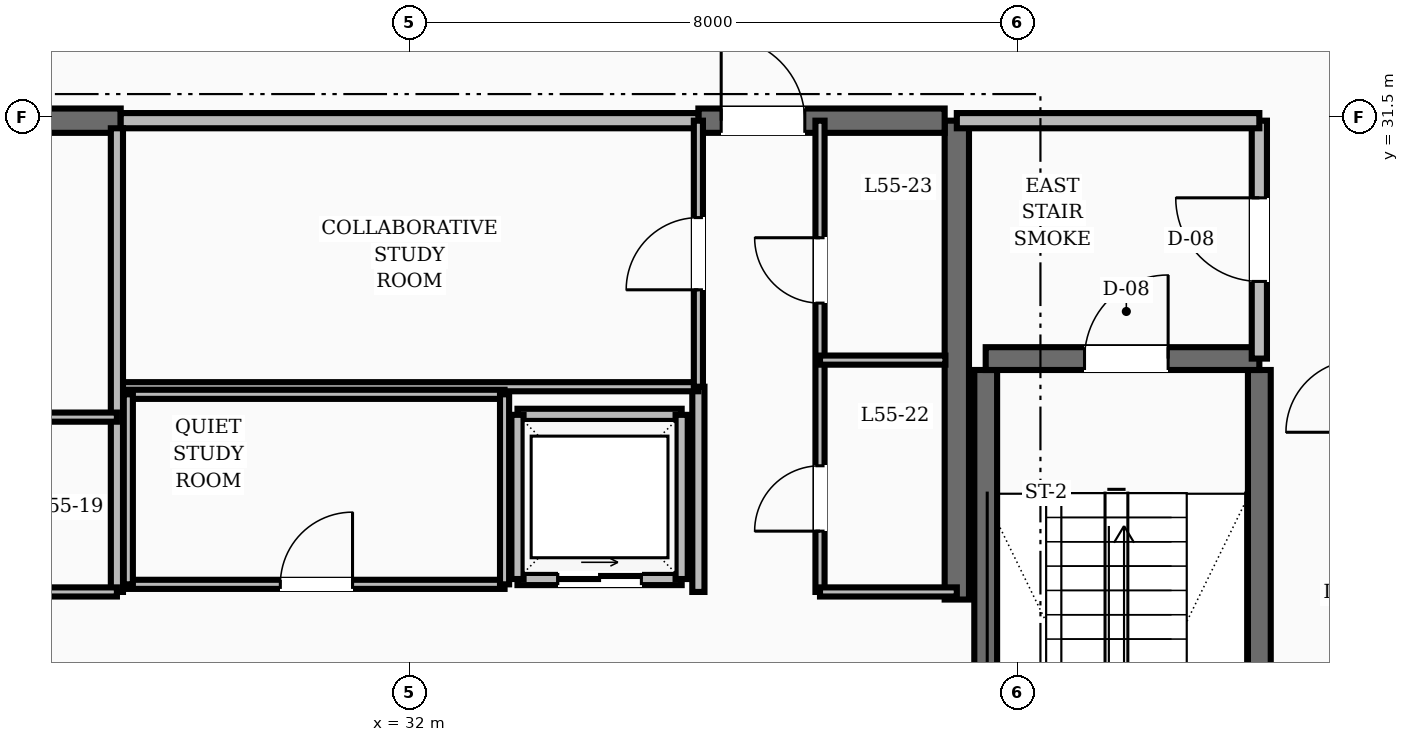
"""IFC4 building model, lengths in metres.
Left out: names, types, materials, properties, quantities, classifications, styles, units other than length and angle.
Written with IfcOpenShell. Run it as: python <this file> out.ifc"""

import sys

from ifc_helpers import new_model, si_unit, direction, frame, frame_2d, origin, place, context, subcontext, project, spatial, rectangle, extrude, element, fill, save


model = new_model("IFC4")
c1 = context("Model", 3, precision=1e-05, world=origin(), true_north=direction((0.0, 1.0)))
c2 = subcontext(c1, "Body", "Model", "MODEL_VIEW")
j1 = project(units=[si_unit("LENGTHUNIT", "METRE"), si_unit("PLANEANGLEUNIT", "RADIAN")], contexts=[c1])
p1 = place(None, origin())
s1 = spatial("IfcSite", under=j1, at=p1, CompositionType="ELEMENT")
p2 = place(p1, origin())
s2 = spatial("IfcBuilding", under=s1, at=p2, CompositionType="ELEMENT")
p3 = place(p2, frame((0.0, 0.0, 214.8)))
s3 = spatial("IfcBuildingStorey", under=s2, at=p3, CompositionType="ELEMENT", Elevation=214.8)
p4 = place(p3, frame((39.2, 25.15, 0.0), z_axis=(0.0, 0.0, 1.0), x_axis=(0.0, 1.0, 0.0)))
e1 = element("IfcWall", 1, at=p4, inside=s3, PredefinedType="SHEAR", context=c2, shape_type="SweptSolid", body=[
    extrude(rectangle(XDim=6.3, YDim=0.32, at=frame_2d((3.15, 0.0))), origin(), (0.0, 0.0, 1.0), 3.6),
])
p5 = place(p3, frame((24.96, 31.45, 0.0), z_axis=(0.0, 0.0, 1.0), x_axis=(1.0, 0.0, 0.0)))
e2 = element("IfcWall", 2, at=p5, inside=s3, PredefinedType="SHEAR", context=c2, shape_type="SweptSolid", body=[
    extrude(rectangle(XDim=3.24, YDim=0.32, at=frame_2d((1.62, 0.0))), origin(), (0.0, 0.0, 1.0), 3.6),
])
p6 = place(p3, frame((35.8, 31.45, 0.0), z_axis=(0.0, 0.0, 1.0), x_axis=(1.0, 0.0, 0.0)))
e3 = element("IfcWall", 3, at=p6, inside=s3, PredefinedType="SHEAR", context=c2, shape_type="SweptSolid", body=[
    extrude(rectangle(XDim=3.24, YDim=0.32, at=frame_2d((1.62, 0.0))), origin(), (0.0, 0.0, 1.0), 3.6),
])
p7 = place(p6, frame((0.3, 0.0, 0.0)))
e4 = element("IfcOpeningElement", 4, at=p7, cuts=e3, PredefinedType="OPENING", context=c2, shape_type="SweptSolid", body=[
    extrude(rectangle(XDim=1.1, YDim=2.1, at=frame_2d((0.55, 1.05))), frame((0.0, 0.17, 0.0), z_axis=(0.0, -1.0, 0.0), x_axis=(1.0, 0.0, 0.0)), (0.0, 0.0, 1.0), 0.34),
])
for number, where, z_axis, x_axis in (
    (5, (43.18, 19.43, 0.0), (0.0, 0.0, 1.0), (0.0, 1.0, 0.0)),
    (6, (39.58, 19.43, 0.0), (0.0, 0.0, 1.0), (0.0, 1.0, 0.0)),
):
    element("IfcWall", number, at=place(p3, frame(where, z_axis=z_axis, x_axis=x_axis)), inside=s3, PredefinedType="SHEAR", context=c2, shape_type="SweptSolid", body=[
        extrude(rectangle(XDim=8.74, YDim=0.3, at=frame_2d((4.37, 0.0))), origin(), (0.0, 0.0, 1.0), 3.6),
    ])
p8 = place(p3, frame((39.58, 28.32, 0.0), z_axis=(0.0, 0.0, 1.0), x_axis=(1.0, 0.0, 0.0)))
e7 = element("IfcWall", 7, at=p8, inside=s3, PredefinedType="SHEAR", context=c2, shape_type="SweptSolid", body=[
    extrude(rectangle(XDim=3.6, YDim=0.3, at=frame_2d((1.8, 0.0))), origin(), (0.0, 0.0, 1.0), 3.6),
])
p9 = place(p8, frame((1.3, 0.0, 0.0)))
e8 = element("IfcOpeningElement", 8, at=p9, cuts=e7, PredefinedType="OPENING", context=c2, shape_type="SweptSolid", body=[
    extrude(rectangle(XDim=1.1, YDim=2.1, at=frame_2d((0.55, 1.05))), frame((0.0, 0.16, 0.0), z_axis=(0.0, -1.0, 0.0), x_axis=(1.0, 0.0, 0.0)), (0.0, 0.0, 1.0), 0.32),
])
p10 = place(p3, frame((43.18, 28.32, 0.0), z_axis=(0.0, 0.0, 1.0), x_axis=(0.0, 1.0, 0.0)))
e9 = element("IfcWall", 9, at=p10, inside=s3, PredefinedType="SOLIDWALL", context=c2, shape_type="SweptSolid", body=[
    extrude(rectangle(XDim=3.13, YDim=0.2, at=frame_2d((1.565, 0.0))), origin(), (0.0, 0.0, 1.0), 2.87),
])
p11 = place(p10, frame((1.015, 0.0, 0.0)))
e10 = element("IfcOpeningElement", 10, at=p11, cuts=e9, PredefinedType="OPENING", context=c2, shape_type="SweptSolid", body=[
    extrude(rectangle(XDim=1.1, YDim=2.1, at=frame_2d((0.55, 1.05))), frame((0.0, 0.11, 0.0), z_axis=(0.0, -1.0, 0.0), x_axis=(1.0, 0.0, 0.0)), (0.0, 0.0, 1.0), 0.22),
])
p12 = place(p3, frame((39.2, 31.45, 0.0), z_axis=(0.0, 0.0, 1.0), x_axis=(1.0, 0.0, 0.0)))
e11 = element("IfcWall", 11, at=p12, inside=s3, PredefinedType="SOLIDWALL", context=c2, shape_type="SweptSolid", body=[
    extrude(rectangle(XDim=3.98, YDim=0.2, at=frame_2d((1.99, 0.0))), origin(), (0.0, 0.0, 1.0), 2.87),
])
p13 = place(p3, frame((35.8, 25.25, 0.0), z_axis=(0.0, 0.0, 1.0), x_axis=(0.0, 1.0, 0.0)))
e12 = element("IfcWall", 12, at=p13, inside=s3, PredefinedType="SOLIDWALL", context=c2, shape_type="SweptSolid", body=[
    extrude(rectangle(XDim=2.7, YDim=0.16, at=frame_2d((1.35, 0.0))), origin(), (0.0, 0.0, 1.0), 2.87),
])
p14 = place(p3, frame((33.42, 25.42, 0.0), z_axis=(0.0, 0.0, 1.0), x_axis=(1.0, 0.0, 0.0)))
e13 = element("IfcWall", 13, at=p14, inside=s3, PredefinedType="SOLIDWALL", context=c2, shape_type="SweptSolid", body=[
    extrude(rectangle(XDim=2.16, YDim=0.16, at=frame_2d((1.08, 0.0))), origin(), (0.0, 0.0, 1.0), 2.87),
])
p15 = place(p14, frame((0.53, 0.0, 0.0)))
e14 = element("IfcOpeningElement", 14, at=p15, cuts=e13, PredefinedType="OPENING", context=c2, shape_type="SweptSolid", body=[
    extrude(rectangle(XDim=1.1, YDim=2.15, at=frame_2d((0.55, 1.075))), frame((0.0, 0.09, 0.0), z_axis=(0.0, -1.0, 0.0), x_axis=(1.0, 0.0, 0.0)), (0.0, 0.0, 1.0), 0.18),
])
for number, where, z_axis, x_axis in (
    (15, (33.42, 27.58, 0.0), (0.0, 0.0, 1.0), (1.0, 0.0, 0.0)),
    (16, (33.42, 25.42, 0.0), (0.0, 0.0, 1.0), (0.0, 1.0, 0.0)),
    (17, (35.58, 25.42, 0.0), (0.0, 0.0, 1.0), (0.0, 1.0, 0.0)),
):
    element("IfcWall", number, at=place(p3, frame(where, z_axis=z_axis, x_axis=x_axis)), inside=s3, PredefinedType="SOLIDWALL", context=c2, shape_type="SweptSolid", body=[
        extrude(rectangle(XDim=2.16, YDim=0.16, at=frame_2d((1.08, 0.0))), origin(), (0.0, 0.0, 1.0), 2.87),
    ])
p16 = place(p3, frame((28.2, 31.45, 0.0), z_axis=(0.0, 0.0, 1.0), x_axis=(1.0, 0.0, 0.0)))
e18 = element("IfcWall", 18, at=p16, inside=s3, PredefinedType="SOLIDWALL", context=c2, shape_type="SweptSolid", body=[
    extrude(rectangle(XDim=7.6, YDim=0.2, at=frame_2d((3.8, 0.0))), origin(), (0.0, 0.0, 1.0), 2.87),
])
p17 = place(p3, frame((28.2, 27.95, 0.0), z_axis=(0.0, 0.0, 1.0), x_axis=(1.0, 0.0, 0.0)))
e19 = element("IfcWall", 19, at=p17, inside=s3, PredefinedType="PARTITIONING", context=c2, shape_type="SweptSolid", body=[
    extrude(rectangle(XDim=7.6, YDim=0.12, at=frame_2d((3.8, 0.0))), origin(), (0.0, 0.0, 1.0), 2.87),
])
p18 = place(p3, frame((35.8, 27.95, 0.0), z_axis=(0.0, 0.0, 1.0), x_axis=(0.0, 1.0, 0.0)))
e20 = element("IfcWall", 20, at=p18, inside=s3, PredefinedType="PARTITIONING", context=c2, shape_type="SweptSolid", body=[
    extrude(rectangle(XDim=3.5, YDim=0.12, at=frame_2d((1.75, 0.0))), origin(), (0.0, 0.0, 1.0), 2.87),
])
p19 = place(p18, frame((1.275, 0.0, 0.0)))
e21 = element("IfcOpeningElement", 21, at=p19, cuts=e20, PredefinedType="OPENING", context=c2, shape_type="SweptSolid", body=[
    extrude(rectangle(XDim=0.95, YDim=2.1, at=frame_2d((0.475, 1.05))), frame((0.0, 0.07, 0.0), z_axis=(0.0, -1.0, 0.0), x_axis=(1.0, 0.0, 0.0)), (0.0, 0.0, 1.0), 0.14),
])
p20 = place(p3, frame((28.3, 25.35, 0.0), z_axis=(0.0, 0.0, 1.0), x_axis=(1.0, 0.0, 0.0)))
e22 = element("IfcWall", 22, at=p20, inside=s3, PredefinedType="PARTITIONING", context=c2, shape_type="SweptSolid", body=[
    extrude(rectangle(XDim=4.95, YDim=0.12, at=frame_2d((2.475, 0.0))), origin(), (0.0, 0.0, 1.0), 2.87),
])
p21 = place(p20, frame((2.0, 0.0, 0.0)))
e23 = element("IfcOpeningElement", 23, at=p21, cuts=e22, PredefinedType="OPENING", context=c2, shape_type="SweptSolid", body=[
    extrude(rectangle(XDim=0.95, YDim=2.1, at=frame_2d((0.475, 1.05))), frame((0.0, 0.07, 0.0), z_axis=(0.0, -1.0, 0.0), x_axis=(1.0, 0.0, 0.0)), (0.0, 0.0, 1.0), 0.14),
])
p22 = place(p3, frame((28.3, 27.85, 0.0), z_axis=(0.0, 0.0, 1.0), x_axis=(1.0, 0.0, 0.0)))
e24 = element("IfcWall", 24, at=p22, inside=s3, PredefinedType="PARTITIONING", context=c2, shape_type="SweptSolid", body=[
    extrude(rectangle(XDim=4.95, YDim=0.12, at=frame_2d((2.475, 0.0))), origin(), (0.0, 0.0, 1.0), 2.87),
])
for number, where, z_axis, x_axis in (
    (25, (28.3, 25.35, 0.0), (0.0, 0.0, 1.0), (0.0, 1.0, 0.0)),
    (26, (33.25, 25.35, 0.0), (0.0, 0.0, 1.0), (0.0, 1.0, 0.0)),
):
    element("IfcWall", number, at=place(p3, frame(where, z_axis=z_axis, x_axis=x_axis)), inside=s3, PredefinedType="PARTITIONING", context=c2, shape_type="SweptSolid", body=[
        extrude(rectangle(XDim=2.5, YDim=0.12, at=frame_2d((1.25, 0.0))), origin(), (0.0, 0.0, 1.0), 2.87),
    ])
p23 = place(p3, frame((28.15, 25.25, 0.0), z_axis=(0.0, 0.0, 1.0), x_axis=(0.0, 1.0, 0.0)))
e27 = element("IfcWall", 27, at=p23, inside=s3, PredefinedType="SOLIDWALL", context=c2, shape_type="SweptSolid", body=[
    extrude(rectangle(XDim=6.1, YDim=0.16, at=frame_2d((3.05, 0.0))), origin(), (0.0, 0.0, 1.0), 2.87),
])
p24 = place(p3, frame((24.95, 25.25, 0.0), z_axis=(0.0, 0.0, 1.0), x_axis=(1.0, 0.0, 0.0)))
e28 = element("IfcWall", 28, at=p24, inside=s3, PredefinedType="PARTITIONING", context=c2, shape_type="SweptSolid", body=[
    extrude(rectangle(XDim=3.2, YDim=0.12, at=frame_2d((1.6, 0.0))), origin(), (0.0, 0.0, 1.0), 2.87),
])
p25 = place(p24, frame((1.125, 0.0, 0.0)))
e29 = element("IfcOpeningElement", 29, at=p25, cuts=e28, PredefinedType="OPENING", context=c2, shape_type="SweptSolid", body=[
    extrude(rectangle(XDim=0.95, YDim=2.1, at=frame_2d((0.475, 1.05))), frame((0.0, 0.07, 0.0), z_axis=(0.0, -1.0, 0.0), x_axis=(1.0, 0.0, 0.0)), (0.0, 0.0, 1.0), 0.14),
])
p26 = place(p3, frame((37.4, 25.25, 0.0), z_axis=(0.0, 0.0, 1.0), x_axis=(0.0, 1.0, 0.0)))
e30 = element("IfcWall", 30, at=p26, inside=s3, PredefinedType="PARTITIONING", context=c2, shape_type="SweptSolid", body=[
    extrude(rectangle(XDim=6.2, YDim=0.12, at=frame_2d((3.1, 0.0))), origin(), (0.0, 0.0, 1.0), 2.87),
])
p27 = place(p26, frame((0.8, 0.0, 0.0)))
e31 = element("IfcOpeningElement", 31, at=p27, cuts=e30, PredefinedType="OPENING", context=c2, shape_type="SweptSolid", body=[
    extrude(rectangle(XDim=0.86, YDim=2.1, at=frame_2d((0.43, 1.05))), frame((0.0, 0.07, 0.0), z_axis=(0.0, -1.0, 0.0), x_axis=(1.0, 0.0, 0.0)), (0.0, 0.0, 1.0), 0.14),
])
p28 = place(p26, frame((3.8, 0.0, 0.0)))
e32 = element("IfcOpeningElement", 32, at=p28, cuts=e30, PredefinedType="OPENING", context=c2, shape_type="SweptSolid", body=[
    extrude(rectangle(XDim=0.86, YDim=2.1, at=frame_2d((0.43, 1.05))), frame((0.0, 0.07, 0.0), z_axis=(0.0, -1.0, 0.0), x_axis=(1.0, 0.0, 0.0)), (0.0, 0.0, 1.0), 0.14),
])
p29 = place(p3, frame((37.4, 25.25, 0.0), z_axis=(0.0, 0.0, 1.0), x_axis=(1.0, 0.0, 0.0)))
e33 = element("IfcWall", 33, at=p29, inside=s3, PredefinedType="PARTITIONING", context=c2, shape_type="SweptSolid", body=[
    extrude(rectangle(XDim=1.8, YDim=0.12, at=frame_2d((0.9, 0.0))), origin(), (0.0, 0.0, 1.0), 2.87),
])
p30 = place(p3, frame((24.95, 27.55, 0.0), z_axis=(0.0, 0.0, 1.0), x_axis=(1.0, 0.0, 0.0)))
e34 = element("IfcWall", 34, at=p30, inside=s3, PredefinedType="PARTITIONING", context=c2, shape_type="SweptSolid", body=[
    extrude(rectangle(XDim=3.2, YDim=0.12, at=frame_2d((1.6, 0.0))), origin(), (0.0, 0.0, 1.0), 2.87),
])
p31 = place(p30, frame((1.125, 0.0, 0.0)))
e35 = element("IfcOpeningElement", 35, at=p31, cuts=e34, PredefinedType="OPENING", context=c2, shape_type="SweptSolid", body=[
    extrude(rectangle(XDim=0.95, YDim=2.1, at=frame_2d((0.475, 1.05))), frame((0.0, 0.07, 0.0), z_axis=(0.0, -1.0, 0.0), x_axis=(1.0, 0.0, 0.0)), (0.0, 0.0, 1.0), 0.14),
])
p32 = place(p3, frame((37.4, 28.3, 0.0), z_axis=(0.0, 0.0, 1.0), x_axis=(1.0, 0.0, 0.0)))
e36 = element("IfcWall", 36, at=p32, inside=s3, PredefinedType="PARTITIONING", context=c2, shape_type="SweptSolid", body=[
    extrude(rectangle(XDim=1.65, YDim=0.12, at=frame_2d((0.825, 0.0))), origin(), (0.0, 0.0, 1.0), 2.87),
])
p33 = place(p3, frame((44.427, 32.303, 0.0), z_axis=(0.0, 0.0, 1.0), x_axis=(-0.707106781187, 0.707106781187, 0.0)))
e37 = element("IfcWall", 37, at=p33, inside=s3, PredefinedType="SOLIDWALL", context=c2, shape_type="SweptSolid", body=[
    extrude(rectangle(XDim=2.916, YDim=0.16, at=frame_2d((1.458, 0.0))), origin(), (0.0, 0.0, 1.0), 2.87),
])
p34 = place(p9, origin())
e38 = element("IfcDoor", 38, at=p34, inside=s3, OperationType="SINGLE_SWING_RIGHT", PredefinedType="DOOR", context=c2, shape_type="SweptSolid", body=[
    extrude(rectangle(XDim=1.1, YDim=2.1, at=frame_2d((0.55, 1.05))), frame((0.0, 0.025, 0.0), z_axis=(0.0, -1.0, 0.0), x_axis=(1.0, 0.0, 0.0)), (0.0, 0.0, 1.0), 0.05),
])
fill(e8, e38)
p35 = place(p11, origin())
e39 = element("IfcDoor", 39, at=p35, inside=s3, OperationType="SINGLE_SWING_RIGHT", PredefinedType="DOOR", context=c2, shape_type="SweptSolid", body=[
    extrude(rectangle(XDim=1.1, YDim=2.1, at=frame_2d((0.55, 1.05))), frame((0.0, 0.025, 0.0), z_axis=(0.0, -1.0, 0.0), x_axis=(1.0, 0.0, 0.0)), (0.0, 0.0, 1.0), 0.05),
])
fill(e10, e39)
p36 = place(p7, origin())
e40 = element("IfcDoor", 40, at=p36, inside=s3, OperationType="SINGLE_SWING_LEFT", PredefinedType="DOOR", context=c2, shape_type="SweptSolid", body=[
    extrude(rectangle(XDim=1.1, YDim=2.1, at=frame_2d((0.55, 1.05))), frame((0.0, 0.025, 0.0), z_axis=(0.0, -1.0, 0.0), x_axis=(1.0, 0.0, 0.0)), (0.0, 0.0, 1.0), 0.05),
])
fill(e4, e40)
p37 = place(p15, origin())
e41 = element("IfcDoor", 41, at=p37, inside=s3, OperationType="SLIDING_TO_RIGHT", PredefinedType="DOOR", context=c2, shape_type="SweptSolid", body=[
    extrude(rectangle(XDim=1.1, YDim=2.15, at=frame_2d((0.55, 1.075))), frame((0.0, 0.025, 0.0), z_axis=(0.0, -1.0, 0.0), x_axis=(1.0, 0.0, 0.0)), (0.0, 0.0, 1.0), 0.05),
])
fill(e14, e41)
p38 = place(p19, origin())
e42 = element("IfcDoor", 42, at=p38, inside=s3, OperationType="SINGLE_SWING_LEFT", PredefinedType="DOOR", context=c2, shape_type="SweptSolid", body=[
    extrude(rectangle(XDim=0.95, YDim=2.1, at=frame_2d((0.475, 1.05))), frame((0.0, 0.025, 0.0), z_axis=(0.0, -1.0, 0.0), x_axis=(1.0, 0.0, 0.0)), (0.0, 0.0, 1.0), 0.05),
])
fill(e21, e42)
p39 = place(p21, origin())
e43 = element("IfcDoor", 43, at=p39, inside=s3, OperationType="SINGLE_SWING_RIGHT", PredefinedType="DOOR", context=c2, shape_type="SweptSolid", body=[
    extrude(rectangle(XDim=0.95, YDim=2.1, at=frame_2d((0.475, 1.05))), frame((0.0, 0.025, 0.0), z_axis=(0.0, -1.0, 0.0), x_axis=(1.0, 0.0, 0.0)), (0.0, 0.0, 1.0), 0.05),
])
fill(e23, e43)
p40 = place(p27, origin())
e44 = element("IfcDoor", 44, at=p40, inside=s3, OperationType="SINGLE_SWING_LEFT", PredefinedType="DOOR", context=c2, shape_type="SweptSolid", body=[
    extrude(rectangle(XDim=0.86, YDim=2.1, at=frame_2d((0.43, 1.05))), frame((0.0, 0.025, 0.0), z_axis=(0.0, -1.0, 0.0), x_axis=(1.0, 0.0, 0.0)), (0.0, 0.0, 1.0), 0.05),
])
fill(e31, e44)
p41 = place(p28, origin())
e45 = element("IfcDoor", 45, at=p41, inside=s3, OperationType="SINGLE_SWING_RIGHT", PredefinedType="DOOR", context=c2, shape_type="SweptSolid", body=[
    extrude(rectangle(XDim=0.86, YDim=2.1, at=frame_2d((0.43, 1.05))), frame((0.0, 0.025, 0.0), z_axis=(0.0, -1.0, 0.0), x_axis=(1.0, 0.0, 0.0)), (0.0, 0.0, 1.0), 0.05),
])
fill(e32, e45)
save(model, sys.argv[1])
